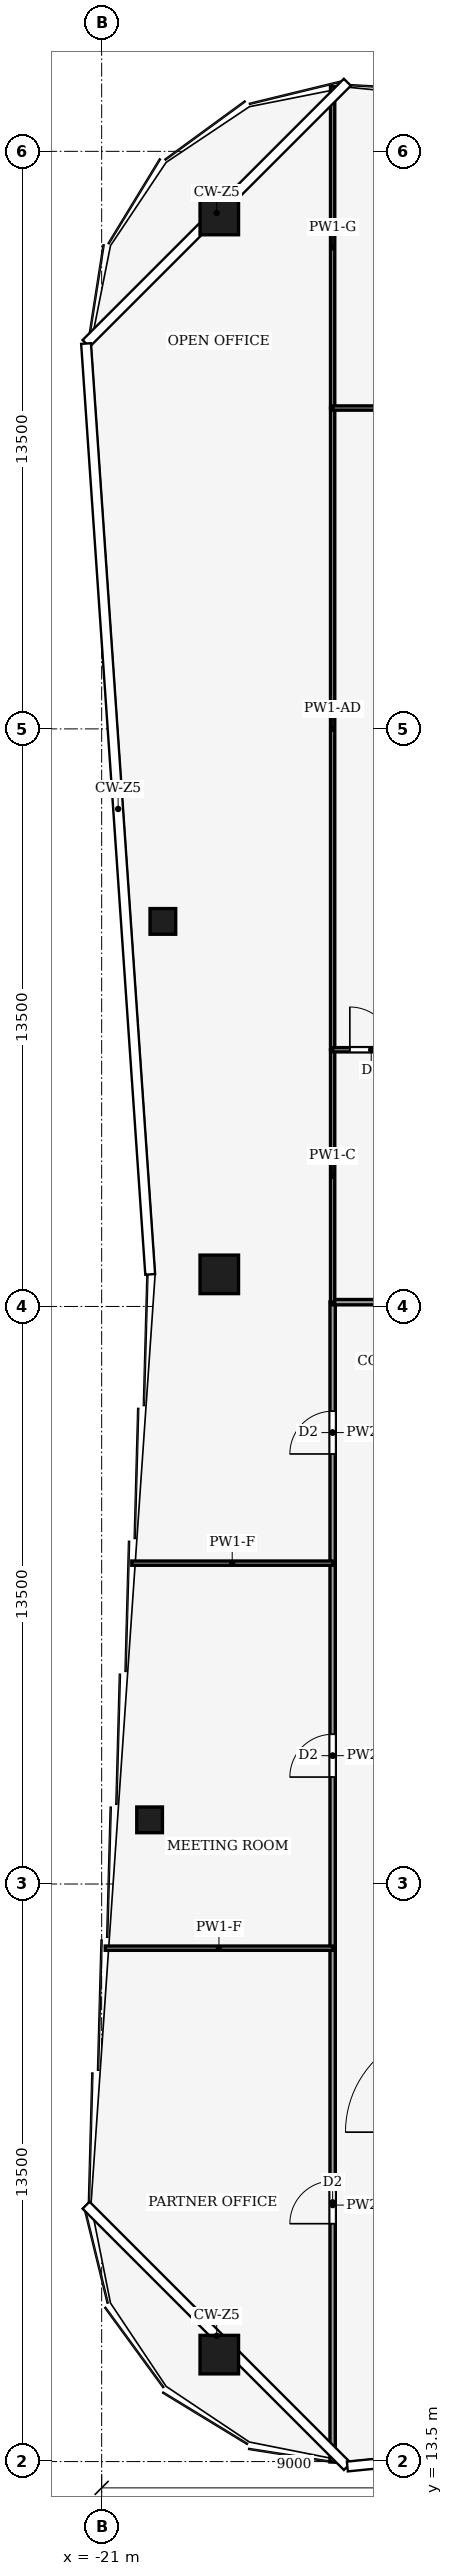
"""IFC4 building model, lengths in metres.
Left out: names, types, materials, properties, quantities, classifications, styles, units other than length and angle.
Written with IfcOpenShell. Run it as: python <this file> out.ifc"""

import sys

from ifc_helpers import new_model, si_unit, direction, frame, frame_2d, origin, origin_2d, place, context, subcontext, project, spatial, rectangle, hollow_rectangle, extrude, element, fill, save


model = new_model("IFC4")
c1 = context("Model", 3, precision=1e-05, world=origin(), true_north=direction((0.0, 1.0)))
c2 = subcontext(c1, "Body", "Model", "MODEL_VIEW")
j1 = project(units=[si_unit("LENGTHUNIT", "METRE"), si_unit("PLANEANGLEUNIT", "RADIAN")], contexts=[c1])
p1 = place(None, origin())
s1 = spatial("IfcSite", under=j1, at=p1, CompositionType="ELEMENT")
p2 = place(p1, origin())
s2 = spatial("IfcBuilding", under=s1, at=p2, CompositionType="ELEMENT")
p3 = place(p2, frame((0.0, 0.0, 310.0)))
s3 = spatial("IfcBuildingStorey", under=s2, at=p3, CompositionType="ELEMENT", Elevation=310.0)
for number, where, z_axis, x_axis in (
    (1, (-18.25, 66.0, 0.0), (0.0, 0.0, 1.0), (1.0, 0.0, 0.0)),
    (2, (-18.25, 16.0, 0.0), (0.0, 0.0, 1.0), (1.0, 0.0, 0.0)),
    (3, (-18.25, 41.25, 0.0), (0.0, 0.0, 1.0), (1.0, 0.0, 0.0)),
):
    element("IfcColumn", number, at=place(p3, frame(where, z_axis=z_axis, x_axis=x_axis)), inside=s3, PredefinedType="COLUMN", context=c2, shape_type="SweptSolid", body=[
        extrude(hollow_rectangle(XDim=0.9, YDim=0.9, WallThickness=0.04, at=origin_2d()), origin(), (0.0, 0.0, 1.0), 4.0),
    ])
for number, where, z_axis, x_axis in (
    (4, (-19.879, 28.5, 0.0), (0.0, 0.0, 1.0), (1.0, 0.0, 0.0)),
    (5, (-19.569, 49.5, 0.0), (0.0, 0.0, 1.0), (1.0, 0.0, 0.0)),
):
    element("IfcColumn", number, at=place(p3, frame(where, z_axis=z_axis, x_axis=x_axis)), inside=s3, PredefinedType="COLUMN", context=c2, shape_type="SweptSolid", body=[
        extrude(hollow_rectangle(XDim=0.6, YDim=0.6, WallThickness=0.025, at=origin_2d()), origin(), (0.0, 0.0, 1.0), 4.0),
    ])
p4 = place(p3, frame((-15.6, 13.49, 0.0), z_axis=(0.0, 0.0, 1.0), x_axis=(0.0, 1.0, 0.0)))
e6 = element("IfcWall", 6, at=p4, inside=s3, PredefinedType="PARTITIONING", context=c2, shape_type="SweptSolid", body=[
    extrude(rectangle(XDim=12.01, YDim=0.125, at=frame_2d((6.005, 0.0))), origin(), (0.0, 0.0, 1.0), 2.93),
])
p5 = place(p4, frame((5.571, 0.0, 0.0)))
e7 = element("IfcOpeningElement", 7, at=p5, cuts=e6, PredefinedType="OPENING", context=c2, shape_type="SweptSolid", body=[
    extrude(rectangle(XDim=1.0, YDim=2.1, at=frame_2d((0.5, 1.05))), frame((0.0, 0.073, 0.0), z_axis=(0.0, -1.0, 0.0), x_axis=(1.0, 0.0, 0.0)), (0.0, 0.0, 1.0), 0.145),
])
p6 = place(p3, frame((-15.6, 25.5, 0.0), z_axis=(0.0, 0.0, 1.0), x_axis=(0.0, 1.0, 0.0)))
e8 = element("IfcWall", 8, at=p6, inside=s3, PredefinedType="PARTITIONING", context=c2, shape_type="SweptSolid", body=[
    extrude(rectangle(XDim=9.0, YDim=0.125, at=frame_2d((4.5, 0.0))), origin(), (0.0, 0.0, 1.0), 3.54),
])
p7 = place(p6, frame((4.0, 0.0, 0.0)))
e9 = element("IfcOpeningElement", 9, at=p7, cuts=e8, PredefinedType="OPENING", context=c2, shape_type="SweptSolid", body=[
    extrude(rectangle(XDim=1.0, YDim=2.1, at=frame_2d((0.5, 1.05))), frame((0.0, 0.073, 0.0), z_axis=(0.0, -1.0, 0.0), x_axis=(1.0, 0.0, 0.0)), (0.0, 0.0, 1.0), 0.145),
])
p8 = place(p3, frame((-15.6, 34.5, 0.0), z_axis=(0.0, 0.0, 1.0), x_axis=(0.0, 1.0, 0.0)))
e10 = element("IfcWall", 10, at=p8, inside=s3, PredefinedType="PARTITIONING", context=c2, shape_type="SweptSolid", body=[
    extrude(rectangle(XDim=6.104, YDim=0.125, at=frame_2d((3.052, 0.0))), origin(), (0.0, 0.0, 1.0), 3.14),
])
p9 = place(p8, frame((2.552, 0.0, 0.0)))
e11 = element("IfcOpeningElement", 11, at=p9, cuts=e10, PredefinedType="OPENING", context=c2, shape_type="SweptSolid", body=[
    extrude(rectangle(XDim=1.0, YDim=2.1, at=frame_2d((0.5, 1.05))), frame((0.0, 0.073, 0.0), z_axis=(0.0, -1.0, 0.0), x_axis=(1.0, 0.0, 0.0)), (0.0, 0.0, 1.0), 0.145),
])
p10 = place(p3, frame((-15.6, 40.6, 0.0), z_axis=(0.0, 0.0, 1.0), x_axis=(1.0, 0.0, 0.0)))
e12 = element("IfcWall", 12, at=p10, inside=s3, PredefinedType="PARTITIONING", context=c2, shape_type="SweptSolid", body=[
    extrude(rectangle(XDim=6.6, YDim=0.125, at=frame_2d((3.3, 0.0))), origin(), (0.0, 0.0, 1.0), 3.39),
])
p11 = place(p10, frame((2.8, 0.0, 0.0)))
e13 = element("IfcOpeningElement", 13, at=p11, cuts=e12, PredefinedType="OPENING", context=c2, shape_type="SweptSolid", body=[
    extrude(rectangle(XDim=1.0, YDim=2.1, at=frame_2d((0.5, 1.05))), frame((0.0, 0.073, 0.0), z_axis=(0.0, -1.0, 0.0), x_axis=(1.0, 0.0, 0.0)), (0.0, 0.0, 1.0), 0.145),
])
p12 = place(p3, frame((-15.6, 25.5, 0.0), z_axis=(0.0, 0.0, 1.0), x_axis=(-1.0, 0.0, 0.0)))
e14 = element("IfcWall", 14, at=p12, inside=s3, PredefinedType="PARTITIONING", context=c2, shape_type="SweptSolid", body=[
    extrude(rectangle(XDim=5.316, YDim=0.1, at=frame_2d((2.658, 0.0))), origin(), (0.0, 0.0, 1.0), 3.04),
])
p13 = place(p3, frame((-15.6, 34.5, 0.0), z_axis=(0.0, 0.0, 1.0), x_axis=(-1.0, 0.0, 0.0)))
e15 = element("IfcWall", 15, at=p13, inside=s3, PredefinedType="PARTITIONING", context=c2, shape_type="SweptSolid", body=[
    extrude(rectangle(XDim=4.695, YDim=0.1, at=frame_2d((2.348, 0.0))), origin(), (0.0, 0.0, 1.0), 3.04),
])
p14 = place(p3, frame((-15.6, 40.6, 0.0), z_axis=(0.0, 0.0, 1.0), x_axis=(0.0, 1.0, 0.0)))
e16 = element("IfcWall", 16, at=p14, inside=s3, PredefinedType="PARTITIONING", context=c2, shape_type="SweptSolid", body=[
    extrude(rectangle(XDim=5.9, YDim=0.1, at=frame_2d((2.95, 0.0))), origin(), (0.0, 0.0, 1.0), 3.87),
])
p15 = place(p3, frame((-15.6, 46.5, 0.0), z_axis=(0.0, 0.0, 1.0), x_axis=(0.0, 1.0, 0.0)))
e17 = element("IfcWall", 17, at=p15, inside=s3, PredefinedType="PARTITIONING", context=c2, shape_type="SweptSolid", body=[
    extrude(rectangle(XDim=15.0, YDim=0.1, at=frame_2d((7.5, 0.0))), origin(), (0.0, 0.0, 1.0), 3.35),
])
p16 = place(p3, frame((-15.6, 61.5, 0.0), z_axis=(0.0, 0.0, 1.0), x_axis=(0.0, 1.0, 0.0)))
e18 = element("IfcWall", 18, at=p16, inside=s3, PredefinedType="PARTITIONING", context=c2, shape_type="SweptSolid", body=[
    extrude(rectangle(XDim=7.51, YDim=0.1, at=frame_2d((3.755, 0.0))), origin(), (0.0, 0.0, 1.0), 2.93),
])
p17 = place(p3, frame((-15.6, 46.5, 0.0), z_axis=(0.0, 0.0, 1.0), x_axis=(1.0, 0.0, 0.0)))
e19 = element("IfcWall", 19, at=p17, inside=s3, PredefinedType="PARTITIONING", context=c2, shape_type="SweptSolid", body=[
    extrude(rectangle(XDim=6.604, YDim=0.1, at=frame_2d((3.302, 0.0))), origin(), (0.0, 0.0, 1.0), 3.39),
])
p18 = place(p17, frame((0.402, 0.0, 0.0)))
e20 = element("IfcOpeningElement", 20, at=p18, cuts=e19, PredefinedType="OPENING", context=c2, shape_type="SweptSolid", body=[
    extrude(rectangle(XDim=1.0, YDim=2.1, at=frame_2d((0.5, 1.05))), frame((0.0, 0.06, 0.0), z_axis=(0.0, -1.0, 0.0), x_axis=(1.0, 0.0, 0.0)), (0.0, 0.0, 1.0), 0.12),
])
p19 = place(p3, frame((-15.6, 61.5, 0.0), z_axis=(0.0, 0.0, 1.0), x_axis=(1.0, 0.0, 0.0)))
e21 = element("IfcWall", 21, at=p19, inside=s3, PredefinedType="PARTITIONING", context=c2, shape_type="SweptSolid", body=[
    extrude(rectangle(XDim=9.6, YDim=0.1, at=frame_2d((4.8, 0.0))), origin(), (0.0, 0.0, 1.0), 3.24),
])
p20 = place(p19, frame((4.3, 0.0, 0.0)))
e22 = element("IfcOpeningElement", 22, at=p20, cuts=e21, PredefinedType="OPENING", context=c2, shape_type="SweptSolid", body=[
    extrude(rectangle(XDim=1.0, YDim=2.1, at=frame_2d((0.5, 1.05))), frame((0.0, 0.06, 0.0), z_axis=(0.0, -1.0, 0.0), x_axis=(1.0, 0.0, 0.0)), (0.0, 0.0, 1.0), 0.12),
])
p21 = place(p5, origin())
e23 = element("IfcDoor", 23, at=p21, inside=s3, OperationType="SINGLE_SWING_RIGHT", PredefinedType="DOOR", context=c2, shape_type="SweptSolid", body=[
    extrude(rectangle(XDim=1.0, YDim=2.1, at=frame_2d((0.5, 1.05))), frame((0.0, 0.025, 0.0), z_axis=(0.0, -1.0, 0.0), x_axis=(1.0, 0.0, 0.0)), (0.0, 0.0, 1.0), 0.05),
])
fill(e7, e23)
p22 = place(p7, origin())
e24 = element("IfcDoor", 24, at=p22, inside=s3, OperationType="SINGLE_SWING_RIGHT", PredefinedType="DOOR", context=c2, shape_type="SweptSolid", body=[
    extrude(rectangle(XDim=1.0, YDim=2.1, at=frame_2d((0.5, 1.05))), frame((0.0, 0.025, 0.0), z_axis=(0.0, -1.0, 0.0), x_axis=(1.0, 0.0, 0.0)), (0.0, 0.0, 1.0), 0.05),
])
fill(e9, e24)
p23 = place(p9, origin())
e25 = element("IfcDoor", 25, at=p23, inside=s3, OperationType="SINGLE_SWING_LEFT", PredefinedType="DOOR", context=c2, shape_type="SweptSolid", body=[
    extrude(rectangle(XDim=1.0, YDim=2.1, at=frame_2d((0.5, 1.05))), frame((0.0, 0.025, 0.0), z_axis=(0.0, -1.0, 0.0), x_axis=(1.0, 0.0, 0.0)), (0.0, 0.0, 1.0), 0.05),
])
fill(e11, e25)
p24 = place(p18, origin())
e26 = element("IfcDoor", 26, at=p24, inside=s3, OperationType="SINGLE_SWING_LEFT", PredefinedType="DOOR", context=c2, shape_type="SweptSolid", body=[
    extrude(rectangle(XDim=1.0, YDim=2.1, at=frame_2d((0.5, 1.05))), frame((0.0, 0.025, 0.0), z_axis=(0.0, -1.0, 0.0), x_axis=(1.0, 0.0, 0.0)), (0.0, 0.0, 1.0), 0.05),
])
fill(e20, e26)
save(model, sys.argv[1])
